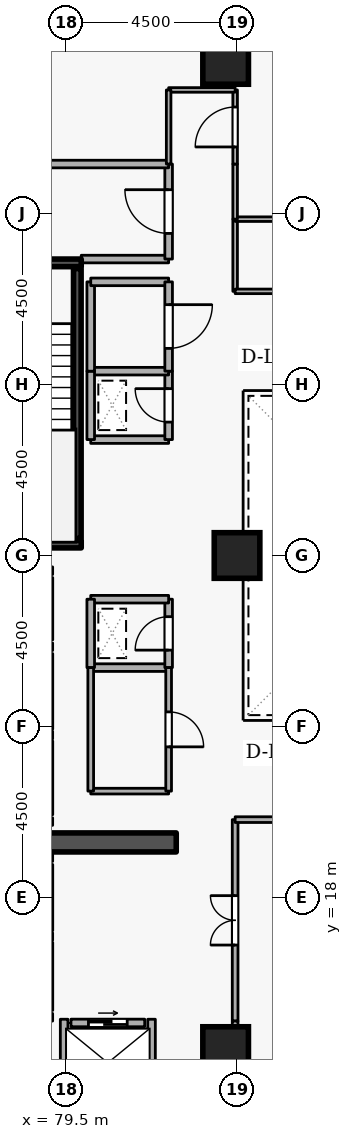
"""IFC4 building model, lengths in metres.
Left out: names, types, materials, properties, quantities, classifications, styles, units other than length and angle.
Written with IfcOpenShell. Run it as: python <this file> out.ifc"""

import sys

from ifc_helpers import new_model, si_unit, direction, frame, frame_2d, origin, origin_2d, place, context, subcontext, project, spatial, rectangle, extrude, element, fill, save


model = new_model("IFC4")
c1 = context("Model", 3, precision=1e-05, world=origin(), true_north=direction((0.0, 1.0)))
c2 = subcontext(c1, "Body", "Model", "MODEL_VIEW")
j1 = project(units=[si_unit("LENGTHUNIT", "METRE"), si_unit("PLANEANGLEUNIT", "RADIAN")], contexts=[c1])
p1 = place(None, origin())
s1 = spatial("IfcSite", under=j1, at=p1, CompositionType="ELEMENT")
p2 = place(p1, origin())
s2 = spatial("IfcBuilding", under=s1, at=p2, CompositionType="ELEMENT")
p3 = place(p2, frame((0.0, 0.0, 137.7)))
s3 = spatial("IfcBuildingStorey", under=s2, at=p3, CompositionType="ELEMENT", Elevation=137.7)
p4 = place(p3, frame((76.6, 19.45, 0.0), z_axis=(0.0, 0.0, 1.0), x_axis=(1.0, 0.0, 0.0)))
e1 = element("IfcWall", 1, at=p4, inside=s3, PredefinedType="SHEAR", context=c2, shape_type="SweptSolid", body=[
    extrude(rectangle(XDim=5.8, YDim=0.5, at=frame_2d((2.9, 0.0))), origin(), (0.0, 0.0, 1.0), 3.6),
])
for number, where, z_axis, x_axis in (
    (2, (83.7, 14.0, 0.0), (0.0, 0.0, 1.0), (1.0, 0.0, 0.0)),
    (3, (83.7, 40.0, 0.0), (0.0, 0.0, 1.0), (1.0, 0.0, 0.0)),
    (4, (84.0, 27.0, 0.0), (0.0, 0.0, 1.0), (1.0, 0.0, 0.0)),
):
    element("IfcColumn", number, at=place(p3, frame(where, z_axis=z_axis, x_axis=x_axis)), inside=s3, PredefinedType="COLUMN", context=c2, shape_type="SweptSolid", body=[
        extrude(rectangle(XDim=1.2, YDim=1.2, at=origin_2d()), origin(), (0.0, 0.0, 1.0), 3.6),
    ])
p5 = place(p3, frame((79.05, 24.78, 0.0), z_axis=(0.0, 0.0, 1.0), x_axis=(0.0, 1.0, 0.0)))
e5 = element("IfcWall", 5, at=p5, inside=s3, PredefinedType="STANDARD", context=c2, shape_type="SweptSolid", body=[
    extrude(rectangle(XDim=1.64, YDim=0.2, at=frame_2d((0.82, 0.0))), origin(), (0.0, 0.0, 1.0), 3.26),
])
p6 = place(p5, frame((0.31, 0.0, 0.0)))
e6 = element("IfcOpeningElement", 6, at=p6, cuts=e5, PredefinedType="OPENING", context=c2, shape_type="SweptSolid", body=[
    extrude(rectangle(XDim=1.02, YDim=2.06, at=frame_2d((0.51, 1.03))), frame((0.0, 0.11, 0.0), z_axis=(0.0, -1.0, 0.0), x_axis=(1.0, 0.0, 0.0)), (0.0, 0.0, 1.0), 0.22),
])
p7 = place(p3, frame((79.05, 22.43, 0.0), z_axis=(0.0, 0.0, 1.0), x_axis=(0.0, 1.0, 0.0)))
e7 = element("IfcWall", 7, at=p7, inside=s3, PredefinedType="STANDARD", context=c2, shape_type="SweptSolid", body=[
    extrude(rectangle(XDim=1.99, YDim=0.2, at=frame_2d((0.995, 0.0))), origin(), (0.0, 0.0, 1.0), 3.26),
])
p8 = place(p3, frame((79.05, 20.18, 0.0), z_axis=(0.0, 0.0, 1.0), x_axis=(0.0, 1.0, 0.0)))
e8 = element("IfcWall", 8, at=p8, inside=s3, PredefinedType="STANDARD", context=c2, shape_type="SweptSolid", body=[
    extrude(rectangle(XDim=1.94, YDim=0.2, at=frame_2d((0.97, 0.0))), origin(), (0.0, 0.0, 1.0), 3.26),
])
p9 = place(p3, frame((79.05, 17.13, 0.0), z_axis=(0.0, 0.0, 1.0), x_axis=(0.0, 1.0, 0.0)))
e9 = element("IfcWall", 9, at=p9, inside=s3, PredefinedType="STANDARD", context=c2, shape_type="SweptSolid", body=[
    extrude(rectangle(XDim=1.74, YDim=0.2, at=frame_2d((0.87, 0.0))), origin(), (0.0, 0.0, 1.0), 3.26),
])
p10 = place(p9, frame((0.36, 0.0, 0.0)))
e10 = element("IfcOpeningElement", 10, at=p10, cuts=e9, PredefinedType="OPENING", context=c2, shape_type="SweptSolid", body=[
    extrude(rectangle(XDim=1.02, YDim=2.06, at=frame_2d((0.51, 1.03))), frame((0.0, 0.11, 0.0), z_axis=(0.0, -1.0, 0.0), x_axis=(1.0, 0.0, 0.0)), (0.0, 0.0, 1.0), 0.22),
])
p11 = place(p3, frame((79.05, 15.03, 0.0), z_axis=(0.0, 0.0, 1.0), x_axis=(0.0, 1.0, 0.0)))
e11 = element("IfcWall", 11, at=p11, inside=s3, PredefinedType="STANDARD", context=c2, shape_type="SweptSolid", body=[
    extrude(rectangle(XDim=1.79, YDim=0.2, at=frame_2d((0.895, 0.0))), origin(), (0.0, 0.0, 1.0), 3.26),
])
p12 = place(p11, frame((0.385, 0.0, 0.0)))
e12 = element("IfcOpeningElement", 12, at=p12, cuts=e11, PredefinedType="OPENING", context=c2, shape_type="SweptSolid", body=[
    extrude(rectangle(XDim=1.02, YDim=2.06, at=frame_2d((0.51, 1.03))), frame((0.0, 0.11, 0.0), z_axis=(0.0, -1.0, 0.0), x_axis=(1.0, 0.0, 0.0)), (0.0, 0.0, 1.0), 0.22),
])
p13 = place(p3, frame((79.63, 14.7, 0.0), z_axis=(0.0, 0.0, 1.0), x_axis=(1.0, 0.0, 0.0)))
e13 = element("IfcWall", 13, at=p13, inside=s3, PredefinedType="STANDARD", context=c2, shape_type="SweptSolid", body=[
    extrude(rectangle(XDim=1.94, YDim=0.2, at=frame_2d((0.97, 0.0))), origin(), (0.0, 0.0, 1.0), 3.26),
])
p14 = place(p13, frame((0.46, 0.0, 0.0)))
e14 = element("IfcOpeningElement", 14, at=p14, cuts=e13, PredefinedType="OPENING", context=c2, shape_type="SweptSolid", body=[
    extrude(rectangle(XDim=1.02, YDim=2.06, at=frame_2d((0.51, 1.03))), frame((0.0, 0.11, 0.0), z_axis=(0.0, -1.0, 0.0), x_axis=(1.0, 0.0, 0.0)), (0.0, 0.0, 1.0), 0.22),
])
for number, where, z_axis, x_axis in (
    (15, (81.75, 12.612, 0.0), (0.0, 0.0, 1.0), (0.0, 1.0, 0.0)),
    (16, (79.45, 12.612, 0.0), (0.0, 0.0, 1.0), (0.0, 1.0, 0.0)),
):
    element("IfcWall", number, at=place(p3, frame(where, z_axis=z_axis, x_axis=x_axis)), inside=s3, PredefinedType="STANDARD", context=c2, shape_type="SweptSolid", body=[
        extrude(rectangle(XDim=2.186, YDim=0.2, at=frame_2d((1.093, 0.0))), origin(), (0.0, 0.0, 1.0), 3.26),
    ])
p15 = place(p3, frame((76.55, 34.7, 0.0), z_axis=(0.0, 0.0, 1.0), x_axis=(1.0, 0.0, 0.0)))
e17 = element("IfcWall", 17, at=p15, inside=s3, PredefinedType="SHEAR", context=c2, shape_type="SweptSolid", body=[
    extrude(rectangle(XDim=3.35, YDim=0.2, at=frame_2d((1.675, 0.0))), origin(), (0.0, 0.0, 1.0), 3.6),
])
p16 = place(p15, frame((1.125, 0.0, 0.0)))
e18 = element("IfcOpeningElement", 18, at=p16, cuts=e17, PredefinedType="OPENING", context=c2, shape_type="SweptSolid", body=[
    extrude(rectangle(XDim=1.1, YDim=2.1, at=frame_2d((0.55, 1.05))), frame((0.0, 0.11, 0.0), z_axis=(0.0, -1.0, 0.0), x_axis=(1.0, 0.0, 0.0)), (0.0, 0.0, 1.0), 0.22),
])
p17 = place(p3, frame((79.9, 27.3, 0.0), z_axis=(0.0, 0.0, 1.0), x_axis=(-1.0, 0.0, 0.0)))
e19 = element("IfcWall", 19, at=p17, inside=s3, PredefinedType="SHEAR", context=c2, shape_type="SweptSolid", body=[
    extrude(rectangle(XDim=3.35, YDim=0.2, at=frame_2d((1.675, 0.0))), origin(), (0.0, 0.0, 1.0), 3.6),
])
p18 = place(p3, frame((79.797, 27.45, 0.0), z_axis=(0.0, 0.0, 1.0), x_axis=(0.0, 1.0, 0.0)))
e20 = element("IfcWall", 20, at=p18, inside=s3, PredefinedType="SHEAR", context=c2, shape_type="SweptSolid", body=[
    extrude(rectangle(XDim=7.1, YDim=0.2, at=frame_2d((3.55, 0.0))), origin(), (0.0, 0.0, 1.0), 3.6),
])
p19 = place(p3, frame((79.9, 34.8, 0.0), z_axis=(0.0, 0.0, 1.0), x_axis=(1.0, 0.0, 0.0)))
e21 = element("IfcWall", 21, at=p19, inside=s3, PredefinedType="STANDARD", context=c2, shape_type="SweptSolid", body=[
    extrude(rectangle(XDim=2.3, YDim=0.2, at=frame_2d((1.15, 0.0))), origin(), (0.0, 0.0, 1.0), 2.465),
])
p20 = place(p3, frame((82.2, 34.8, 0.0), z_axis=(0.0, 0.0, 1.0), x_axis=(0.0, 1.0, 0.0)))
e22 = element("IfcWall", 22, at=p20, inside=s3, PredefinedType="STANDARD", context=c2, shape_type="SweptSolid", body=[
    extrude(rectangle(XDim=2.5, YDim=0.2, at=frame_2d((1.25, 0.0))), origin(), (0.0, 0.0, 1.0), 3.26),
])
p21 = place(p20, frame((0.675, 0.0, 0.0)))
e23 = element("IfcOpeningElement", 23, at=p21, cuts=e22, PredefinedType="OPENING", context=c2, shape_type="SweptSolid", body=[
    extrude(rectangle(XDim=1.15, YDim=2.1, at=frame_2d((0.575, 1.05))), frame((0.0, 0.11, 0.0), z_axis=(0.0, -1.0, 0.0), x_axis=(1.0, 0.0, 0.0)), (0.0, 0.0, 1.0), 0.22),
])
p22 = place(p3, frame((82.2, 37.3, 0.0), z_axis=(0.0, 0.0, 1.0), x_axis=(-1.0, 0.0, 0.0)))
e24 = element("IfcWall", 24, at=p22, inside=s3, PredefinedType="STANDARD", context=c2, shape_type="SweptSolid", body=[
    extrude(rectangle(XDim=5.7, YDim=0.2, at=frame_2d((2.85, 0.0))), origin(), (0.0, 0.0, 1.0), 3.26),
])
p23 = place(p3, frame((80.15, 24.05, 0.0), z_axis=(0.0, 0.0, 1.0), x_axis=(1.0, 0.0, 0.0)))
e25 = element("IfcWall", 25, at=p23, inside=s3, PredefinedType="STANDARD", context=c2, shape_type="SweptSolid", body=[
    extrude(rectangle(XDim=2.05, YDim=0.2, at=frame_2d((1.025, 0.0))), origin(), (0.0, 0.0, 1.0), 3.26),
])
p24 = place(p3, frame((82.2, 24.05, 0.0), z_axis=(0.0, 0.0, 1.0), x_axis=(0.0, 1.0, 0.0)))
e26 = element("IfcWall", 26, at=p24, inside=s3, PredefinedType="STANDARD", context=c2, shape_type="SweptSolid", body=[
    extrude(rectangle(XDim=1.8, YDim=0.2, at=frame_2d((0.9, 0.0))), origin(), (0.0, 0.0, 1.0), 3.26),
])
p25 = place(p24, frame((0.46, 0.0, 0.0)))
e27 = element("IfcOpeningElement", 27, at=p25, cuts=e26, PredefinedType="OPENING", context=c2, shape_type="SweptSolid", body=[
    extrude(rectangle(XDim=0.88, YDim=2.04, at=frame_2d((0.44, 1.02))), frame((0.0, 0.11, 0.0), z_axis=(0.0, -1.0, 0.0), x_axis=(1.0, 0.0, 0.0)), (0.0, 0.0, 1.0), 0.22),
])
p26 = place(p3, frame((82.2, 25.85, 0.0), z_axis=(0.0, 0.0, 1.0), x_axis=(-1.0, 0.0, 0.0)))
e28 = element("IfcWall", 28, at=p26, inside=s3, PredefinedType="STANDARD", context=c2, shape_type="SweptSolid", body=[
    extrude(rectangle(XDim=2.05, YDim=0.2, at=frame_2d((1.025, 0.0))), origin(), (0.0, 0.0, 1.0), 3.26),
])
p27 = place(p3, frame((80.15, 25.85, 0.0), z_axis=(0.0, 0.0, 1.0), x_axis=(0.0, -1.0, 0.0)))
e29 = element("IfcWall", 29, at=p27, inside=s3, PredefinedType="STANDARD", context=c2, shape_type="SweptSolid", body=[
    extrude(rectangle(XDim=1.8, YDim=0.2, at=frame_2d((0.9, 0.0))), origin(), (0.0, 0.0, 1.0), 3.26),
])
p28 = place(p3, frame((80.15, 30.05, 0.0), z_axis=(0.0, 0.0, 1.0), x_axis=(1.0, 0.0, 0.0)))
e30 = element("IfcWall", 30, at=p28, inside=s3, PredefinedType="STANDARD", context=c2, shape_type="SweptSolid", body=[
    extrude(rectangle(XDim=2.05, YDim=0.2, at=frame_2d((1.025, 0.0))), origin(), (0.0, 0.0, 1.0), 3.26),
])
p29 = place(p3, frame((82.2, 30.05, 0.0), z_axis=(0.0, 0.0, 1.0), x_axis=(0.0, 1.0, 0.0)))
e31 = element("IfcWall", 31, at=p29, inside=s3, PredefinedType="STANDARD", context=c2, shape_type="SweptSolid", body=[
    extrude(rectangle(XDim=1.8, YDim=0.2, at=frame_2d((0.9, 0.0))), origin(), (0.0, 0.0, 1.0), 3.26),
])
p30 = place(p29, frame((0.46, 0.0, 0.0)))
e32 = element("IfcOpeningElement", 32, at=p30, cuts=e31, PredefinedType="OPENING", context=c2, shape_type="SweptSolid", body=[
    extrude(rectangle(XDim=0.88, YDim=2.04, at=frame_2d((0.44, 1.02))), frame((0.0, 0.11, 0.0), z_axis=(0.0, -1.0, 0.0), x_axis=(1.0, 0.0, 0.0)), (0.0, 0.0, 1.0), 0.22),
])
p31 = place(p3, frame((82.2, 31.85, 0.0), z_axis=(0.0, 0.0, 1.0), x_axis=(-1.0, 0.0, 0.0)))
e33 = element("IfcWall", 33, at=p31, inside=s3, PredefinedType="STANDARD", context=c2, shape_type="SweptSolid", body=[
    extrude(rectangle(XDim=2.05, YDim=0.2, at=frame_2d((1.025, 0.0))), origin(), (0.0, 0.0, 1.0), 3.26),
])
p32 = place(p3, frame((80.15, 31.85, 0.0), z_axis=(0.0, 0.0, 1.0), x_axis=(0.0, -1.0, 0.0)))
e34 = element("IfcWall", 34, at=p32, inside=s3, PredefinedType="STANDARD", context=c2, shape_type="SweptSolid", body=[
    extrude(rectangle(XDim=1.8, YDim=0.2, at=frame_2d((0.9, 0.0))), origin(), (0.0, 0.0, 1.0), 3.26),
])
p33 = place(p3, frame((80.15, 31.85, 0.0), z_axis=(0.0, 0.0, 1.0), x_axis=(0.0, 1.0, 0.0)))
e35 = element("IfcWall", 35, at=p33, inside=s3, PredefinedType="STANDARD", context=c2, shape_type="SweptSolid", body=[
    extrude(rectangle(XDim=2.35, YDim=0.2, at=frame_2d((1.175, 0.0))), origin(), (0.0, 0.0, 1.0), 3.26),
])
p34 = place(p3, frame((80.15, 34.2, 0.0), z_axis=(0.0, 0.0, 1.0), x_axis=(1.0, 0.0, 0.0)))
e36 = element("IfcWall", 36, at=p34, inside=s3, PredefinedType="STANDARD", context=c2, shape_type="SweptSolid", body=[
    extrude(rectangle(XDim=2.05, YDim=0.2, at=frame_2d((1.025, 0.0))), origin(), (0.0, 0.0, 1.0), 2.465),
])
p35 = place(p3, frame((82.2, 34.2, 0.0), z_axis=(0.0, 0.0, 1.0), x_axis=(0.0, -1.0, 0.0)))
e37 = element("IfcWall", 37, at=p35, inside=s3, PredefinedType="STANDARD", context=c2, shape_type="SweptSolid", body=[
    extrude(rectangle(XDim=2.35, YDim=0.2, at=frame_2d((1.175, 0.0))), origin(), (0.0, 0.0, 1.0), 3.26),
])
p36 = place(p35, frame((0.6, 0.0, 0.0)))
e38 = element("IfcOpeningElement", 38, at=p36, cuts=e37, PredefinedType="OPENING", context=c2, shape_type="SweptSolid", body=[
    extrude(rectangle(XDim=1.15, YDim=2.1, at=frame_2d((0.575, 1.05))), frame((0.0, 0.11, 0.0), z_axis=(0.0, -1.0, 0.0), x_axis=(1.0, 0.0, 0.0)), (0.0, 0.0, 1.0), 0.22),
])
p37 = place(p3, frame((82.2, 20.8, 0.0), z_axis=(0.0, 0.0, 1.0), x_axis=(-1.0, 0.0, 0.0)))
e39 = element("IfcWall", 39, at=p37, inside=s3, PredefinedType="PARTITIONING", context=c2, shape_type="SweptSolid", body=[
    extrude(rectangle(XDim=2.05, YDim=0.15, at=frame_2d((1.025, 0.0))), origin(), (0.0, 0.0, 1.0), 3.26),
])
p38 = place(p3, frame((80.15, 20.8, 0.0), z_axis=(0.0, 0.0, 1.0), x_axis=(0.0, 1.0, 0.0)))
e40 = element("IfcWall", 40, at=p38, inside=s3, PredefinedType="PARTITIONING", context=c2, shape_type="SweptSolid", body=[
    extrude(rectangle(XDim=3.25, YDim=0.15, at=frame_2d((1.625, 0.0))), origin(), (0.0, 0.0, 1.0), 3.26),
])
p39 = place(p3, frame((82.2, 24.05, 0.0), z_axis=(0.0, 0.0, 1.0), x_axis=(0.0, -1.0, 0.0)))
e41 = element("IfcWall", 41, at=p39, inside=s3, PredefinedType="PARTITIONING", context=c2, shape_type="SweptSolid", body=[
    extrude(rectangle(XDim=3.25, YDim=0.15, at=frame_2d((1.625, 0.0))), origin(), (0.0, 0.0, 1.0), 3.26),
])
p40 = place(p39, frame((1.165, 0.0, 0.0)))
e42 = element("IfcOpeningElement", 42, at=p40, cuts=e41, PredefinedType="OPENING", context=c2, shape_type="SweptSolid", body=[
    extrude(rectangle(XDim=0.92, YDim=2.08, at=frame_2d((0.46, 1.04))), frame((0.0, 0.085, 0.0), z_axis=(0.0, -1.0, 0.0), x_axis=(1.0, 0.0, 0.0)), (0.0, 0.0, 1.0), 0.17),
])
p41 = place(p3, frame((83.95, 14.75, 0.0), z_axis=(0.0, 0.0, 1.0), x_axis=(0.0, 1.0, 0.0)))
e43 = element("IfcWall", 43, at=p41, inside=s3, PredefinedType="PARTITIONING", context=c2, shape_type="SweptSolid", body=[
    extrude(rectangle(XDim=5.3, YDim=0.15, at=frame_2d((2.65, 0.0))), origin(), (0.0, 0.0, 1.0), 3.26),
])
p42 = place(p41, frame((2.0, 0.0, 0.0)))
e44 = element("IfcOpeningElement", 44, at=p42, cuts=e43, PredefinedType="OPENING", context=c2, shape_type="SweptSolid", body=[
    extrude(rectangle(XDim=1.3, YDim=2.12, at=frame_2d((0.65, 1.06))), frame((0.0, 0.085, 0.0), z_axis=(0.0, -1.0, 0.0), x_axis=(1.0, 0.0, 0.0)), (0.0, 0.0, 1.0), 0.17),
])
p43 = place(p3, frame((83.95, 20.05, 0.0), z_axis=(0.0, 0.0, 1.0), x_axis=(1.0, 0.0, 0.0)))
e45 = element("IfcWall", 45, at=p43, inside=s3, PredefinedType="PARTITIONING", context=c2, shape_type="SweptSolid", body=[
    extrude(rectangle(XDim=2.25, YDim=0.15, at=frame_2d((1.125, 0.0))), origin(), (0.0, 0.0, 1.0), 3.26),
])
p44 = place(p3, frame((83.95, 12.4, 0.0), z_axis=(0.0, 0.0, 1.0), x_axis=(0.0, 1.0, 0.0)))
e46 = element("IfcWall", 46, at=p44, inside=s3, PredefinedType="PARTITIONING", context=c2, shape_type="SweptSolid", body=[
    extrude(rectangle(XDim=2.35, YDim=0.15, at=frame_2d((1.175, 0.0))), origin(), (0.0, 0.0, 1.0), 3.26),
])
p45 = place(p3, frame((83.95, 33.95, 0.0), z_axis=(0.0, 0.0, 1.0), x_axis=(0.0, 1.0, 0.0)))
e47 = element("IfcWall", 47, at=p45, inside=s3, PredefinedType="PARTITIONING", context=c2, shape_type="SweptSolid", body=[
    extrude(rectangle(XDim=1.9, YDim=0.12, at=frame_2d((0.95, 0.0))), origin(), (0.0, 0.0, 1.0), 3.26),
])
p46 = place(p3, frame((83.95, 35.85, 0.0), z_axis=(0.0, 0.0, 1.0), x_axis=(1.0, 0.0, 0.0)))
e48 = element("IfcWall", 48, at=p46, inside=s3, PredefinedType="PARTITIONING", context=c2, shape_type="SweptSolid", body=[
    extrude(rectangle(XDim=4.55, YDim=0.12, at=frame_2d((2.275, 0.0))), origin(), (0.0, 0.0, 1.0), 3.26),
])
p47 = place(p3, frame((88.5, 33.95, 0.0), z_axis=(0.0, 0.0, 1.0), x_axis=(-1.0, 0.0, 0.0)))
e49 = element("IfcWall", 49, at=p47, inside=s3, PredefinedType="PARTITIONING", context=c2, shape_type="SweptSolid", body=[
    extrude(rectangle(XDim=4.55, YDim=0.12, at=frame_2d((2.275, 0.0))), origin(), (0.0, 0.0, 1.0), 3.26),
])
p48 = place(p47, frame((1.8, 0.0, 0.0)))
e50 = element("IfcOpeningElement", 50, at=p48, cuts=e49, PredefinedType="OPENING", context=c2, shape_type="SweptSolid", body=[
    extrude(rectangle(XDim=0.95, YDim=2.1, at=frame_2d((0.475, 1.05))), frame((0.0, 0.07, 0.0), z_axis=(0.0, -1.0, 0.0), x_axis=(1.0, 0.0, 0.0)), (0.0, 0.0, 1.0), 0.14),
])
p49 = place(p3, frame((83.95, 35.85, 0.0), z_axis=(0.0, 0.0, 1.0), x_axis=(0.0, 1.0, 0.0)))
e51 = element("IfcWall", 51, at=p49, inside=s3, PredefinedType="PARTITIONING", context=c2, shape_type="SweptSolid", body=[
    extrude(rectangle(XDim=1.45, YDim=0.12, at=frame_2d((0.725, 0.0))), origin(), (0.0, 0.0, 1.0), 3.26),
])
p50 = place(p3, frame((83.95, 37.3, 0.0), z_axis=(0.0, 0.0, 1.0), x_axis=(0.0, 1.0, 0.0)))
e52 = element("IfcWall", 52, at=p50, inside=s3, PredefinedType="PARTITIONING", context=c2, shape_type="SweptSolid", body=[
    extrude(rectangle(XDim=1.95, YDim=0.12, at=frame_2d((0.975, 0.0))), origin(), (0.0, 0.0, 1.0), 3.26),
])
p51 = place(p50, frame((0.45, 0.0, 0.0)))
e53 = element("IfcOpeningElement", 53, at=p51, cuts=e52, PredefinedType="OPENING", context=c2, shape_type="SweptSolid", body=[
    extrude(rectangle(XDim=1.05, YDim=2.1, at=frame_2d((0.525, 1.05))), frame((0.0, 0.07, 0.0), z_axis=(0.0, -1.0, 0.0), x_axis=(1.0, 0.0, 0.0)), (0.0, 0.0, 1.0), 0.14),
])
p52 = place(p3, frame((83.95, 39.25, 0.0), z_axis=(0.0, 0.0, 1.0), x_axis=(-1.0, 0.0, 0.0)))
e54 = element("IfcWall", 54, at=p52, inside=s3, PredefinedType="PARTITIONING", context=c2, shape_type="SweptSolid", body=[
    extrude(rectangle(XDim=1.75, YDim=0.12, at=frame_2d((0.875, 0.0))), origin(), (0.0, 0.0, 1.0), 3.26),
])
p53 = place(p3, frame((82.2, 39.25, 0.0), z_axis=(0.0, 0.0, 1.0), x_axis=(0.0, -1.0, 0.0)))
e55 = element("IfcWall", 55, at=p53, inside=s3, PredefinedType="PARTITIONING", context=c2, shape_type="SweptSolid", body=[
    extrude(rectangle(XDim=1.95, YDim=0.12, at=frame_2d((0.975, 0.0))), origin(), (0.0, 0.0, 1.0), 3.26),
])
p54 = place(p14, origin())
e56 = element("IfcDoor", 56, at=p54, inside=s3, OperationType="SLIDING_TO_LEFT", PredefinedType="DOOR", context=c2, shape_type="SweptSolid", body=[
    extrude(rectangle(XDim=1.02, YDim=2.06, at=frame_2d((0.51, 1.03))), frame((0.0, 0.025, 0.0), z_axis=(0.0, -1.0, 0.0), x_axis=(1.0, 0.0, 0.0)), (0.0, 0.0, 1.0), 0.05),
])
fill(e14, e56)
p55 = place(p21, origin())
e57 = element("IfcDoor", 57, at=p55, inside=s3, OperationType="SINGLE_SWING_RIGHT", PredefinedType="DOOR", context=c2, shape_type="SweptSolid", body=[
    extrude(rectangle(XDim=1.15, YDim=2.1, at=frame_2d((0.575, 1.05))), frame((0.0, 0.025, 0.0), z_axis=(0.0, -1.0, 0.0), x_axis=(1.0, 0.0, 0.0)), (0.0, 0.0, 1.0), 0.05),
])
fill(e23, e57)
p56 = place(p25, origin())
e58 = element("IfcDoor", 58, at=p56, inside=s3, OperationType="SINGLE_SWING_LEFT", PredefinedType="DOOR", context=c2, shape_type="SweptSolid", body=[
    extrude(rectangle(XDim=0.88, YDim=2.04, at=frame_2d((0.44, 1.02))), frame((0.0, 0.025, 0.0), z_axis=(0.0, -1.0, 0.0), x_axis=(1.0, 0.0, 0.0)), (0.0, 0.0, 1.0), 0.05),
])
fill(e27, e58)
p57 = place(p30, origin())
e59 = element("IfcDoor", 59, at=p57, inside=s3, OperationType="SINGLE_SWING_RIGHT", PredefinedType="DOOR", context=c2, shape_type="SweptSolid", body=[
    extrude(rectangle(XDim=0.88, YDim=2.04, at=frame_2d((0.44, 1.02))), frame((0.0, 0.025, 0.0), z_axis=(0.0, -1.0, 0.0), x_axis=(1.0, 0.0, 0.0)), (0.0, 0.0, 1.0), 0.05),
])
fill(e32, e59)
p58 = place(p40, origin())
e60 = element("IfcDoor", 60, at=p58, inside=s3, OperationType="SINGLE_SWING_RIGHT", PredefinedType="DOOR", context=c2, shape_type="SweptSolid", body=[
    extrude(rectangle(XDim=0.92, YDim=2.08, at=frame_2d((0.46, 1.04))), frame((0.0, 0.025, 0.0), z_axis=(0.0, -1.0, 0.0), x_axis=(1.0, 0.0, 0.0)), (0.0, 0.0, 1.0), 0.05),
])
fill(e42, e60)
p59 = place(p36, origin())
e61 = element("IfcDoor", 61, at=p59, inside=s3, OperationType="SINGLE_SWING_LEFT", PredefinedType="DOOR", context=c2, shape_type="SweptSolid", body=[
    extrude(rectangle(XDim=1.15, YDim=2.1, at=frame_2d((0.575, 1.05))), frame((0.0, 0.025, 0.0), z_axis=(0.0, -1.0, 0.0), x_axis=(1.0, 0.0, 0.0)), (0.0, 0.0, 1.0), 0.05),
])
fill(e38, e61)
p60 = place(p42, origin())
e62 = element("IfcDoor", 62, at=p60, inside=s3, OperationType="DOUBLE_DOOR_SINGLE_SWING", PredefinedType="DOOR", context=c2, shape_type="SweptSolid", body=[
    extrude(rectangle(XDim=1.3, YDim=2.12, at=frame_2d((0.65, 1.06))), frame((0.0, 0.025, 0.0), z_axis=(0.0, -1.0, 0.0), x_axis=(1.0, 0.0, 0.0)), (0.0, 0.0, 1.0), 0.05),
])
fill(e44, e62)
p61 = place(p51, origin())
e63 = element("IfcDoor", 63, at=p61, inside=s3, OperationType="SINGLE_SWING_LEFT", PredefinedType="DOOR", context=c2, shape_type="SweptSolid", body=[
    extrude(rectangle(XDim=1.05, YDim=2.1, at=frame_2d((0.525, 1.05))), frame((0.0, 0.025, 0.0), z_axis=(0.0, -1.0, 0.0), x_axis=(1.0, 0.0, 0.0)), (0.0, 0.0, 1.0), 0.05),
])
fill(e53, e63)
save(model, sys.argv[1])
